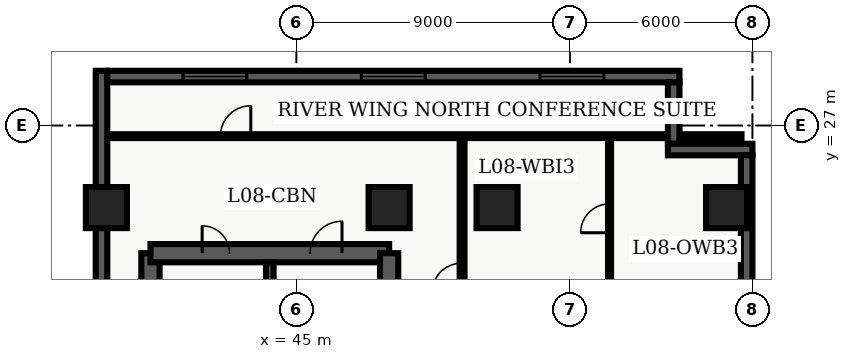
"""IFC4 building model, lengths in metres.
Left out: names, types, materials, properties, quantities, classifications, styles, units other than length and angle.
Written with IfcOpenShell. Run it as: python <this file> out.ifc"""

import sys

from ifc_helpers import new_model, entity, si_unit, converted_unit, direction, frame, origin_with_axes, origin_2d_with_axis, place, context, subcontext, project, spatial, polyline, rectangle, outline, extrude, element, fill, save


model = new_model("IFC4")
c1 = context("Model", 3, precision=1e-05, world=origin_with_axes(), true_north=direction((0.0, 1.0)))
c2 = subcontext(c1, "Body", "Model", "MODEL_VIEW")
j1 = project(units=[si_unit("LENGTHUNIT", "METRE"), converted_unit("PLANEANGLEUNIT", "DEGREE", entity("IfcPlaneAngleMeasure", 0.017), si_unit("PLANEANGLEUNIT", "RADIAN"), dimensions=[0, 0, 0, 0, 0, 0, 0])], contexts=[c1])
p1 = place(None, origin_with_axes())
s1 = spatial("IfcSite", under=j1, at=p1, CompositionType="ELEMENT")
p2 = place(p1, origin_with_axes())
s2 = spatial("IfcBuilding", under=s1, at=p2, CompositionType="ELEMENT")
p3 = place(p2, frame((0.0, 0.0, 36.6), z_axis=(0.0, 0.0, 1.0), x_axis=(1.0, 0.0, 0.0)))
s3 = spatial("IfcBuildingStorey", under=s2, at=p3, CompositionType="ELEMENT", Elevation=36.6)
p4 = place(p3, frame((40.2, 7.2, 0.0), z_axis=(0.0, 0.0, 1.0), x_axis=(0.0, 1.0, 0.0)))
e1 = element("IfcWall", 1, at=p4, inside=s3, PredefinedType="SHEAR", context=c2, shape_type="SweptSolid", body=[
    extrude(outline(polyline([(0.0, -0.3), (15.6, -0.3), (15.6, 0.3), (0.0, 0.3), (0.0, -0.3)])), origin_with_axes(), (0.0, 0.0, 1.0), 3.66),
])
p5 = place(p4, frame((12.75, 0.0, 0.0), z_axis=(0.0, 0.0, 1.0), x_axis=(1.0, 0.0, 0.0)))
e2 = element("IfcOpeningElement", 2, at=p5, cuts=e1, PredefinedType="OPENING", context=c2, shape_type="SweptSolid", body=[
    extrude(rectangle(XDim=1.2, YDim=0.62, at=origin_2d_with_axis()), origin_with_axes(), (0.0, 0.0, 1.0), 2.15),
])
p6 = place(p4, frame((9.3, 0.0, 0.0), z_axis=(0.0, 0.0, 1.0), x_axis=(1.0, 0.0, 0.0)))
e3 = element("IfcOpeningElement", 3, at=p6, cuts=e1, PredefinedType="OPENING", context=c2, shape_type="SweptSolid", body=[
    extrude(rectangle(XDim=0.9, YDim=0.62, at=origin_2d_with_axis()), origin_with_axes(), (0.0, 0.0, 1.0), 2.15),
])
p7 = place(p3, frame((40.2, 22.8, 0.0), z_axis=(0.0, 0.0, 1.0), x_axis=(1.0, 0.0, 0.0)))
e4 = element("IfcWall", 4, at=p7, inside=s3, PredefinedType="SHEAR", context=c2, shape_type="SweptSolid", body=[
    extrude(outline(polyline([(0.0, -0.3), (7.85, -0.3), (7.85, 0.3), (0.0, 0.3), (0.0, -0.3)])), origin_with_axes(), (0.0, 0.0, 1.0), 3.66),
])
p8 = place(p7, frame((5.775, 0.0, 0.0), z_axis=(0.0, 0.0, 1.0), x_axis=(1.0, 0.0, 0.0)))
e5 = element("IfcOpeningElement", 5, at=p8, cuts=e4, PredefinedType="OPENING", context=c2, shape_type="SweptSolid", body=[
    extrude(rectangle(XDim=1.05, YDim=0.62, at=origin_2d_with_axis()), origin_with_axes(), (0.0, 0.0, 1.0), 2.15),
])
p9 = place(p7, frame((2.15, 0.0, 0.0), z_axis=(0.0, 0.0, 1.0), x_axis=(1.0, 0.0, 0.0)))
e6 = element("IfcOpeningElement", 6, at=p9, cuts=e4, PredefinedType="OPENING", context=c2, shape_type="SweptSolid", body=[
    extrude(rectangle(XDim=0.9, YDim=0.62, at=origin_2d_with_axis()), origin_with_axes(), (0.0, 0.0, 1.0), 2.15),
])
p10 = place(p3, frame((48.05, 7.2, 0.0), z_axis=(0.0, 0.0, 1.0), x_axis=(0.0, 1.0, 0.0)))
e7 = element("IfcWall", 7, at=p10, inside=s3, PredefinedType="SHEAR", context=c2, shape_type="SweptSolid", body=[
    extrude(outline(polyline([(0.0, -0.3), (15.6, -0.3), (15.6, 0.3), (0.0, 0.3), (0.0, -0.3)])), origin_with_axes(), (0.0, 0.0, 1.0), 3.66),
])
p11 = place(p10, frame((1.425, 0.0, 0.0), z_axis=(0.0, 0.0, 1.0), x_axis=(1.0, 0.0, 0.0)))
e8 = element("IfcOpeningElement", 8, at=p11, cuts=e7, PredefinedType="OPENING", context=c2, shape_type="SweptSolid", body=[
    extrude(rectangle(XDim=1.05, YDim=0.62, at=origin_2d_with_axis()), origin_with_axes(), (0.0, 0.0, 1.0), 2.15),
])
p12 = place(p10, frame((3.475, 0.0, 0.0), z_axis=(0.0, 0.0, 1.0), x_axis=(1.0, 0.0, 0.0)))
e9 = element("IfcOpeningElement", 9, at=p12, cuts=e7, PredefinedType="OPENING", context=c2, shape_type="SweptSolid", body=[
    extrude(rectangle(XDim=1.05, YDim=0.62, at=origin_2d_with_axis()), origin_with_axes(), (0.0, 0.0, 1.0), 2.15),
])
p13 = place(p10, frame((5.625, 0.0, 0.0), z_axis=(0.0, 0.0, 1.0), x_axis=(1.0, 0.0, 0.0)))
e10 = element("IfcOpeningElement", 10, at=p13, cuts=e7, PredefinedType="OPENING", context=c2, shape_type="SweptSolid", body=[
    extrude(rectangle(XDim=0.95, YDim=0.62, at=origin_2d_with_axis()), origin_with_axes(), (0.0, 0.0, 1.0), 2.15),
])
p14 = place(p3, frame((44.125, 7.5, 0.0), z_axis=(0.0, 0.0, 1.0), x_axis=(0.0, 1.0, 0.0)))
e11 = element("IfcWall", 11, at=p14, inside=s3, PredefinedType="SHEAR", context=c2, shape_type="SweptSolid", body=[
    extrude(outline(polyline([(0.0, -0.125), (15.0, -0.125), (15.0, 0.125), (0.0, 0.125), (0.0, -0.125)])), origin_with_axes(), (0.0, 0.0, 1.0), 3.66),
])
for number, where, z_axis, x_axis in (
    (12, (38.75, 24.3, 0.0), (0.0, 0.0, 1.0), (1.0, 0.0, 0.0)),
    (13, (48.05, 24.3, 0.0), (0.0, 0.0, 1.0), (1.0, 0.0, 0.0)),
    (14, (51.6, 24.3, 0.0), (0.0, 0.0, 1.0), (1.0, 0.0, 0.0)),
    (15, (59.15, 24.3, 0.0), (0.0, 0.0, 1.0), (1.0, 0.0, 0.0)),
):
    element("IfcColumn", number, at=place(p3, frame(where, z_axis=z_axis, x_axis=x_axis)), inside=s3, PredefinedType="COLUMN", context=c2, shape_type="SweptSolid", body=[
        extrude(rectangle(XDim=1.35, YDim=1.35, at=origin_2d_with_axis()), origin_with_axes(), (0.0, 0.0, 1.0), 3.9),
    ])
p15 = place(p3, frame((50.45, 7.85, 0.0), z_axis=(0.0, 0.0, 1.0), x_axis=(0.0, 1.0, 0.0)))
e16 = element("IfcWall", 16, at=p15, inside=s3, PredefinedType="PARTITIONING", context=c2, shape_type="SweptSolid", body=[
    extrude(outline(polyline([(0.0, -0.08), (18.8, -0.08), (18.8, 0.08), (0.0, 0.08), (0.0, -0.08)])), origin_with_axes(), (0.0, 0.0, 1.0), 2.7),
])
p16 = place(p15, frame((4.564, 0.0, 0.0), z_axis=(0.0, 0.0, 1.0), x_axis=(1.0, 0.0, 0.0)))
e17 = element("IfcOpeningElement", 17, at=p16, cuts=e16, PredefinedType="OPENING", context=c2, shape_type="SweptSolid", body=[
    extrude(rectangle(XDim=1.0, YDim=0.18, at=origin_2d_with_axis()), origin_with_axes(), (0.0, 0.0, 1.0), 2.15),
])
p17 = place(p15, frame((11.541, 0.0, 0.0), z_axis=(0.0, 0.0, 1.0), x_axis=(1.0, 0.0, 0.0)))
e18 = element("IfcOpeningElement", 18, at=p17, cuts=e16, PredefinedType="OPENING", context=c2, shape_type="SweptSolid", body=[
    extrude(rectangle(XDim=1.0, YDim=0.18, at=origin_2d_with_axis()), origin_with_axes(), (0.0, 0.0, 1.0), 2.15),
])
p18 = place(p15, frame((14.125, 0.0, 0.0), z_axis=(0.0, 0.0, 1.0), x_axis=(1.0, 0.0, 0.0)))
e19 = element("IfcOpeningElement", 19, at=p18, cuts=e16, PredefinedType="OPENING", context=c2, shape_type="SweptSolid", body=[
    extrude(rectangle(XDim=1.0, YDim=0.18, at=origin_2d_with_axis()), origin_with_axes(), (0.0, 0.0, 1.0), 2.15),
])
p19 = place(p3, frame((38.76, 26.65, 0.0), z_axis=(0.0, 0.0, 1.0), x_axis=(1.0, 0.0, 0.0)))
e20 = element("IfcWall", 20, at=p19, inside=s3, PredefinedType="PARTITIONING", context=c2, shape_type="SweptSolid", body=[
    extrude(outline(polyline([(0.0, -0.062), (20.88, -0.062), (20.88, 0.062), (0.0, 0.062), (0.0, -0.062)])), origin_with_axes(), (0.0, 0.0, 1.0), 2.7),
])
p20 = place(p19, frame((4.24, 0.0, 0.0), z_axis=(0.0, 0.0, 1.0), x_axis=(1.0, 0.0, 0.0)))
e21 = element("IfcOpeningElement", 21, at=p20, cuts=e20, PredefinedType="OPENING", context=c2, shape_type="SweptSolid", body=[
    extrude(rectangle(XDim=1.0, YDim=0.145, at=origin_2d_with_axis()), origin_with_axes(), (0.0, 0.0, 1.0), 2.15),
])
p21 = place(p3, frame((55.3, 7.98, 0.0), z_axis=(0.0, 0.0, 1.0), x_axis=(0.0, 1.0, 0.0)))
e22 = element("IfcWall", 22, at=p21, inside=s3, PredefinedType="PARTITIONING", context=c2, shape_type="SweptSolid", body=[
    extrude(outline(polyline([(0.0, -0.05), (18.54, -0.05), (18.54, 0.05), (0.0, 0.05), (0.0, -0.05)])), origin_with_axes(), (0.0, 0.0, 1.0), 2.7),
])
p22 = place(p21, frame((4.434, 0.0, 0.0), z_axis=(0.0, 0.0, 1.0), x_axis=(1.0, 0.0, 0.0)))
e23 = element("IfcOpeningElement", 23, at=p22, cuts=e22, PredefinedType="OPENING", context=c2, shape_type="SweptSolid", body=[
    extrude(rectangle(XDim=0.95, YDim=0.12, at=origin_2d_with_axis()), origin_with_axes(), (0.0, 0.0, 1.0), 2.15),
])
p23 = place(p21, frame((11.132, 0.0, 0.0), z_axis=(0.0, 0.0, 1.0), x_axis=(1.0, 0.0, 0.0)))
e24 = element("IfcOpeningElement", 24, at=p23, cuts=e22, PredefinedType="OPENING", context=c2, shape_type="SweptSolid", body=[
    extrude(rectangle(XDim=0.95, YDim=0.12, at=origin_2d_with_axis()), origin_with_axes(), (0.0, 0.0, 1.0), 2.15),
])
p24 = place(p21, frame((15.967, 0.0, 0.0), z_axis=(0.0, 0.0, 1.0), x_axis=(1.0, 0.0, 0.0)))
e25 = element("IfcOpeningElement", 25, at=p24, cuts=e22, PredefinedType="OPENING", context=c2, shape_type="SweptSolid", body=[
    extrude(rectangle(XDim=0.95, YDim=0.12, at=origin_2d_with_axis()), origin_with_axes(), (0.0, 0.0, 1.0), 2.15),
])
p25 = place(p3, frame((38.59, 21.22, 0.0), z_axis=(0.0, 0.0, 1.0), x_axis=(0.0, 1.0, 0.0)))
e26 = element("IfcWall", 26, at=p25, inside=s3, PredefinedType="SOLIDWALL", context=c2, shape_type="SweptSolid", body=[
    extrude(outline(polyline([(0.0, -0.19), (7.58, -0.19), (7.58, 0.19), (0.0, 0.19), (0.0, -0.19)])), origin_with_axes(), (0.0, 0.0, 1.0), 3.66),
])
p26 = place(p3, frame((38.78, 28.61, 0.0), z_axis=(0.0, 0.0, 1.0), x_axis=(1.0, 0.0, 0.0)))
e27 = element("IfcWall", 27, at=p26, inside=s3, PredefinedType="SOLIDWALL", context=c2, shape_type="SweptSolid", body=[
    extrude(outline(polyline([(0.0, -0.19), (18.82, -0.19), (18.82, 0.19), (0.0, 0.19), (0.0, -0.19)])), origin_with_axes(), (0.0, 0.0, 1.0), 3.66),
])
p27 = place(p26, frame((3.537, 0.0, 0.45), z_axis=(0.0, 0.0, 1.0), x_axis=(1.0, 0.0, 0.0)))
e28 = element("IfcOpeningElement", 28, at=p27, cuts=e27, PredefinedType="OPENING", context=c2, shape_type="SweptSolid", body=[
    extrude(rectangle(XDim=2.1, YDim=0.4, at=origin_2d_with_axis()), origin_with_axes(), (0.0, 0.0, 1.0), 2.2),
])
p28 = place(p26, frame((9.41, 0.0, 0.45), z_axis=(0.0, 0.0, 1.0), x_axis=(1.0, 0.0, 0.0)))
e29 = element("IfcOpeningElement", 29, at=p28, cuts=e27, PredefinedType="OPENING", context=c2, shape_type="SweptSolid", body=[
    extrude(rectangle(XDim=2.1, YDim=0.4, at=origin_2d_with_axis()), origin_with_axes(), (0.0, 0.0, 1.0), 2.2),
])
p29 = place(p26, frame((15.283, 0.0, 0.45), z_axis=(0.0, 0.0, 1.0), x_axis=(1.0, 0.0, 0.0)))
e30 = element("IfcOpeningElement", 30, at=p29, cuts=e27, PredefinedType="OPENING", context=c2, shape_type="SweptSolid", body=[
    extrude(rectangle(XDim=2.1, YDim=0.4, at=origin_2d_with_axis()), origin_with_axes(), (0.0, 0.0, 1.0), 2.2),
])
p30 = place(p3, frame((57.41, 28.42, 0.0), z_axis=(0.0, 0.0, 1.0), x_axis=(0.0, -1.0, 0.0)))
e31 = element("IfcWall", 31, at=p30, inside=s3, PredefinedType="SOLIDWALL", context=c2, shape_type="SweptSolid", body=[
    extrude(outline(polyline([(0.0, -0.19), (2.02, -0.19), (2.02, 0.19), (0.0, 0.19), (0.0, -0.19)])), origin_with_axes(), (0.0, 0.0, 1.0), 3.66),
])
p31 = place(p3, frame((57.22, 26.21, 0.0), z_axis=(0.0, 0.0, 1.0), x_axis=(1.0, 0.0, 0.0)))
e32 = element("IfcWall", 32, at=p31, inside=s3, PredefinedType="SOLIDWALL", context=c2, shape_type="SweptSolid", body=[
    extrude(outline(polyline([(0.0, -0.19), (2.78, -0.19), (2.78, 0.19), (0.0, 0.19), (0.0, -0.19)])), origin_with_axes(), (0.0, 0.0, 1.0), 3.66),
])
p32 = place(p3, frame((59.81, 26.02, 0.0), z_axis=(0.0, 0.0, 1.0), x_axis=(0.0, -1.0, 0.0)))
e33 = element("IfcWall", 33, at=p32, inside=s3, PredefinedType="SOLIDWALL", context=c2, shape_type="SweptSolid", body=[
    extrude(outline(polyline([(0.0, -0.19), (23.62, -0.19), (23.62, 0.19), (0.0, 0.19), (0.0, -0.19)])), origin_with_axes(), (0.0, 0.0, 1.0), 3.66),
])
p33 = place(p32, frame((20.218, 0.0, 0.45), z_axis=(0.0, 0.0, 1.0), x_axis=(1.0, 0.0, 0.0)))
e34 = element("IfcOpeningElement", 34, at=p33, cuts=e33, PredefinedType="OPENING", context=c2, shape_type="SweptSolid", body=[
    extrude(rectangle(XDim=2.1, YDim=0.4, at=origin_2d_with_axis()), origin_with_axes(), (0.0, 0.0, 1.0), 2.2),
])
p34 = place(p7, frame((5.775, 0.0, 0.0), z_axis=(0.0, 0.0, 1.0), x_axis=(1.0, 0.0, 0.0)))
e35 = element("IfcDoor", 35, at=p34, inside=s3, OperationType="SINGLE_SWING_RIGHT", PredefinedType="DOOR", context=c2, shape_type="SweptSolid", body=[
    extrude(rectangle(XDim=1.05, YDim=0.09, at=origin_2d_with_axis()), origin_with_axes(), (0.0, 0.0, 1.0), 2.15),
])
fill(e5, e35)
p35 = place(p7, frame((2.15, 0.0, 0.0), z_axis=(0.0, 0.0, 1.0), x_axis=(1.0, 0.0, 0.0)))
e36 = element("IfcDoor", 36, at=p35, inside=s3, OperationType="SINGLE_SWING_LEFT", PredefinedType="DOOR", context=c2, shape_type="SweptSolid", body=[
    extrude(rectangle(XDim=0.9, YDim=0.09, at=origin_2d_with_axis()), origin_with_axes(), (0.0, 0.0, 1.0), 2.15),
])
fill(e6, e36)
p36 = place(p19, frame((4.24, 0.0, 0.0), z_axis=(0.0, 0.0, 1.0), x_axis=(1.0, 0.0, 0.0)))
e37 = element("IfcDoor", 37, at=p36, inside=s3, OperationType="SINGLE_SWING_RIGHT", PredefinedType="DOOR", context=c2, shape_type="SweptSolid", body=[
    extrude(rectangle(XDim=1.0, YDim=0.075, at=origin_2d_with_axis()), origin_with_axes(), (0.0, 0.0, 1.0), 2.15),
])
fill(e21, e37)
p37 = place(p21, frame((15.967, 0.0, 0.0), z_axis=(0.0, 0.0, 1.0), x_axis=(1.0, 0.0, 0.0)))
e38 = element("IfcDoor", 38, at=p37, inside=s3, OperationType="SINGLE_SWING_LEFT", PredefinedType="DOOR", context=c2, shape_type="SweptSolid", body=[
    extrude(rectangle(XDim=0.95, YDim=0.06, at=origin_2d_with_axis()), origin_with_axes(), (0.0, 0.0, 1.0), 2.15),
])
fill(e25, e38)
p38 = place(p15, frame((14.125, 0.0, 0.0), z_axis=(0.0, 0.0, 1.0), x_axis=(1.0, 0.0, 0.0)))
e39 = element("IfcDoor", 39, at=p38, inside=s3, OperationType="SINGLE_SWING_LEFT", PredefinedType="DOOR", context=c2, shape_type="SweptSolid", body=[
    extrude(rectangle(XDim=1.0, YDim=0.09, at=origin_2d_with_axis()), origin_with_axes(), (0.0, 0.0, 1.0), 2.15),
])
fill(e19, e39)
p39 = place(p26, frame((3.537, 0.0, 0.45), z_axis=(0.0, 0.0, 1.0), x_axis=(1.0, 0.0, 0.0)))
e40 = element("IfcWindow", 40, at=p39, inside=s3, PredefinedType="WINDOW", context=c2, shape_type="SweptSolid", body=[
    extrude(rectangle(XDim=2.1, YDim=0.09, at=origin_2d_with_axis()), origin_with_axes(), (0.0, 0.0, 1.0), 2.2),
])
fill(e28, e40)
p40 = place(p26, frame((9.41, 0.0, 0.45), z_axis=(0.0, 0.0, 1.0), x_axis=(1.0, 0.0, 0.0)))
e41 = element("IfcWindow", 41, at=p40, inside=s3, PredefinedType="WINDOW", context=c2, shape_type="SweptSolid", body=[
    extrude(rectangle(XDim=2.1, YDim=0.09, at=origin_2d_with_axis()), origin_with_axes(), (0.0, 0.0, 1.0), 2.2),
])
fill(e29, e41)
p41 = place(p26, frame((15.283, 0.0, 0.45), z_axis=(0.0, 0.0, 1.0), x_axis=(1.0, 0.0, 0.0)))
e42 = element("IfcWindow", 42, at=p41, inside=s3, PredefinedType="WINDOW", context=c2, shape_type="SweptSolid", body=[
    extrude(rectangle(XDim=2.1, YDim=0.09, at=origin_2d_with_axis()), origin_with_axes(), (0.0, 0.0, 1.0), 2.2),
])
fill(e30, e42)
save(model, sys.argv[1])
